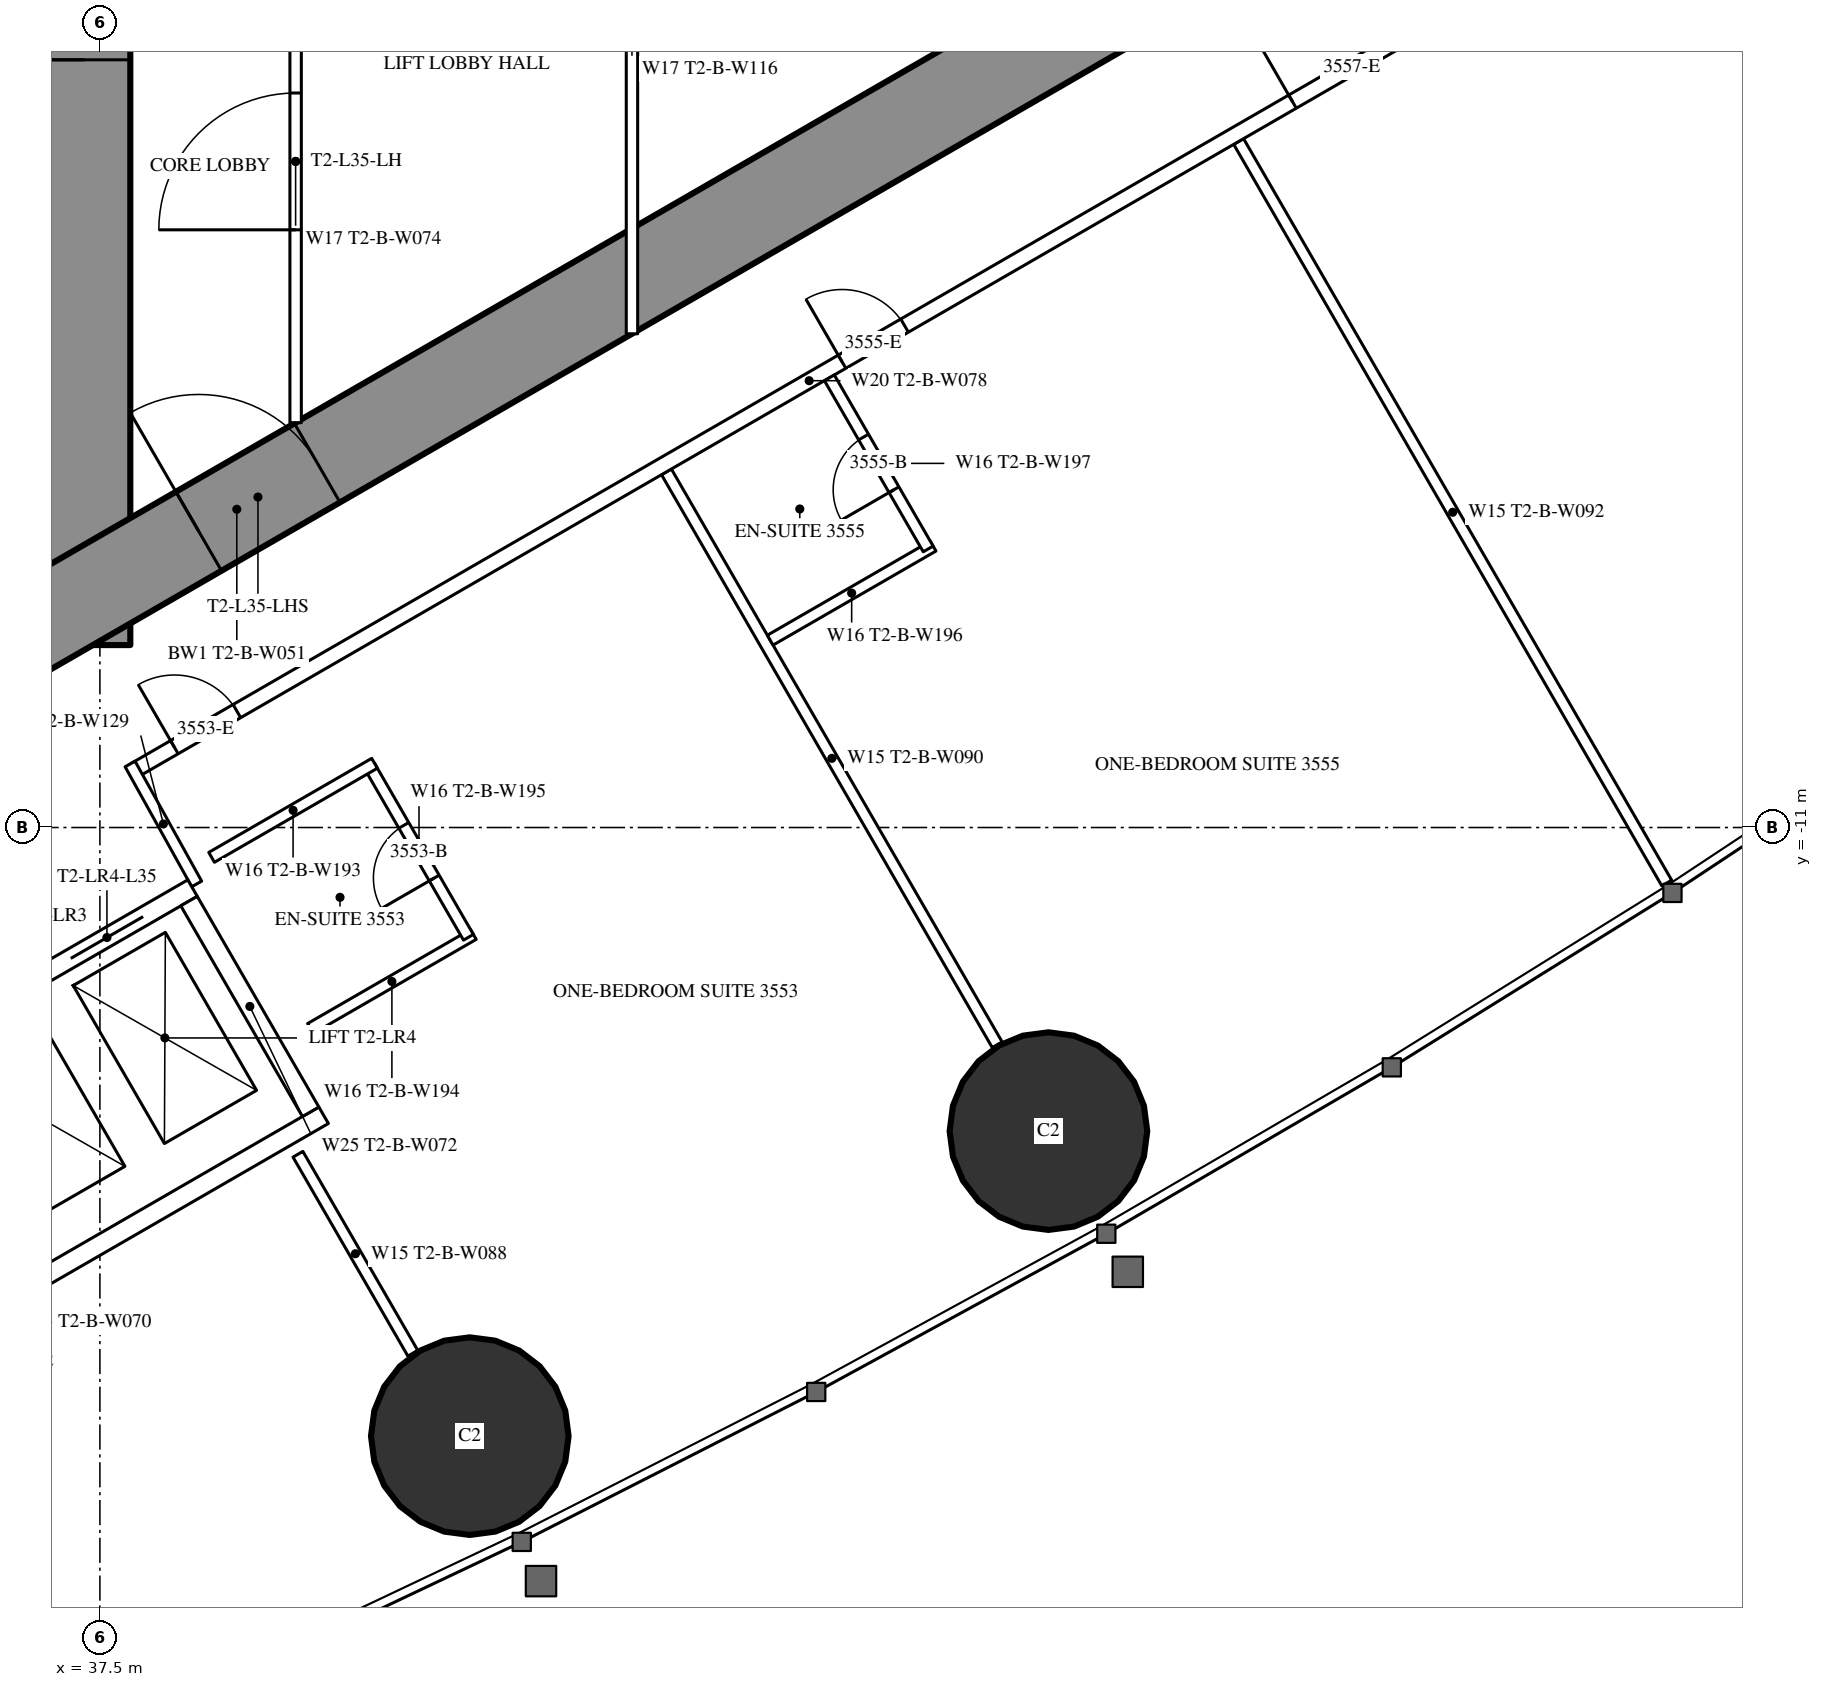
"""IFC4 building model, lengths in metres.
Left out: names, types, materials, properties, quantities, classifications, styles, units other than length and angle.
Written with IfcOpenShell. Run it as: python <this file> out.ifc"""

import sys

from ifc_helpers import new_model, si_unit, direction, frame, frame_2d, origin, origin_2d, place, context, subcontext, project, spatial, rectangle, hollow_circle, extrude, element, fill, save


model = new_model("IFC4")
c1 = context("Model", 3, precision=1e-05, world=origin(), true_north=direction((0.0, 1.0)))
c2 = subcontext(c1, "Body", "Model", "MODEL_VIEW")
j1 = project(units=[si_unit("LENGTHUNIT", "METRE"), si_unit("PLANEANGLEUNIT", "RADIAN")], contexts=[c1])
p1 = place(None, origin())
s1 = spatial("IfcSite", under=j1, at=p1, CompositionType="ELEMENT")
p2 = place(p1, origin())
s2 = spatial("IfcBuilding", under=s1, at=p2, CompositionType="ELEMENT")
p3 = place(p2, frame((0.0, 0.0, 132.6)))
s3 = spatial("IfcBuildingStorey", under=s2, at=p3, CompositionType="ELEMENT", Elevation=132.6)
for number, where, z_axis, x_axis in (
    (1, (42.366, -19.007, 0.0), (0.0, 0.0, 1.0), (1.0, 0.0, 0.0)),
    (2, (49.979, -14.994, 0.0), (0.0, 0.0, 1.0), (1.0, 0.0, 0.0)),
):
    element("IfcColumn", number, at=place(p3, frame(where, z_axis=z_axis, x_axis=x_axis)), inside=s3, PredefinedType="COLUMN", context=c2, shape_type="SweptSolid", body=[
        extrude(hollow_circle(Radius=1.3, WallThickness=0.1, at=origin_2d()), origin(), (0.0, 0.0, 1.0), 3.5),
    ])
p4 = place(p3, frame((37.3, -8.6, 0.0), z_axis=(0.0, 0.0, 1.0), x_axis=(0.0, 1.0, 0.0)))
e3 = element("IfcWall", 3, at=p4, inside=s3, PredefinedType="SHEAR", context=c2, shape_type="SweptSolid", body=[
    extrude(rectangle(XDim=17.2, YDim=1.2, at=frame_2d((8.6, 0.0))), origin(), (0.0, 0.0, 1.0), 3.5),
])
p5 = place(p4, frame((7.7, 0.0, 0.0)))
e4 = element("IfcOpeningElement", 4, at=p5, cuts=e3, PredefinedType="OPENING", context=c2, shape_type="SweptSolid", body=[
    extrude(rectangle(XDim=1.8, YDim=2.2, at=frame_2d((0.9, 1.1))), frame((0.0, 0.61, 0.0), z_axis=(0.0, -1.0, 0.0), x_axis=(1.0, 0.0, 0.0)), (0.0, 0.0, 1.0), 1.22),
])
p6 = place(p3, frame((27.2, -13.8, 0.0), z_axis=(0.0, 0.0, 1.0), x_axis=(0.866027159892, 0.499996958321, 0.0)))
e5 = element("IfcWall", 5, at=p6, inside=s3, PredefinedType="SHEAR", context=c2, shape_type="SweptSolid", body=[
    extrude(rectangle(XDim=27.947, YDim=1.2, at=frame_2d((13.973, 0.0))), origin(), (0.0, 0.0, 1.0), 3.5),
])
p7 = place(p6, frame((4.6, 0.0, 0.0)))
e6 = element("IfcOpeningElement", 6, at=p7, cuts=e5, PredefinedType="OPENING", context=c2, shape_type="SweptSolid", body=[
    extrude(rectangle(XDim=1.0, YDim=2.2, at=frame_2d((0.5, 1.1))), frame((0.0, 0.61, 0.0), z_axis=(0.0, -1.0, 0.0), x_axis=(1.0, 0.0, 0.0)), (0.0, 0.0, 1.0), 1.22),
])
p8 = place(p6, frame((13.395, 0.0, 0.0)))
e7 = element("IfcOpeningElement", 7, at=p8, cuts=e5, PredefinedType="OPENING", context=c2, shape_type="SweptSolid", body=[
    extrude(rectangle(XDim=1.8, YDim=2.2, at=frame_2d((0.9, 1.1))), frame((0.0, 0.61, 0.0), z_axis=(0.0, -1.0, 0.0), x_axis=(1.0, 0.0, 0.0)), (0.0, 0.0, 1.0), 1.22),
])
p9 = place(p3, frame((44.954, -6.321, 0.0), z_axis=(0.0, 0.0, 1.0), x_axis=(0.500018676722, -0.866014620505, 0.0)))
e8 = element("IfcWall", 8, at=p9, inside=s3, PredefinedType="PARTITIONING", context=c2, shape_type="SweptSolid", body=[
    extrude(rectangle(XDim=8.704, YDim=0.15, at=frame_2d((4.352, 0.0))), origin(), (0.0, 0.0, 1.0), 2.2),
])
p10 = place(p3, frame((52.481, -1.975, 0.0), z_axis=(0.0, 0.0, 1.0), x_axis=(0.500003867771, -0.866023170714, 0.0)))
e9 = element("IfcWall", 9, at=p10, inside=s3, PredefinedType="PARTITIONING", context=c2, shape_type="SweptSolid", body=[
    extrude(rectangle(XDim=11.265, YDim=0.15, at=frame_2d((5.632, 0.0))), origin(), (0.0, 0.0, 1.0), 3.25),
])
p11 = place(p3, frame((40.105, -15.299, 0.0), z_axis=(0.0, 0.0, 1.0), x_axis=(0.499978822259, -0.866037630414, 0.0)))
e10 = element("IfcWall", 10, at=p11, inside=s3, PredefinedType="PARTITIONING", context=c2, shape_type="SweptSolid", body=[
    extrude(rectangle(XDim=3.023, YDim=0.15, at=frame_2d((1.511, 0.0))), origin(), (0.0, 0.0, 1.0), 3.25),
])
p12 = place(p3, frame((37.96, -10.243, 0.0), z_axis=(0.0, 0.0, 1.0), x_axis=(0.866026429433, 0.499998223521, 0.0)))
e11 = element("IfcWall", 11, at=p12, inside=s3, PredefinedType="PARTITIONING", context=c2, shape_type="SweptSolid", body=[
    extrude(rectangle(XDim=20.487, YDim=0.2, at=frame_2d((10.243, 0.0))), origin(), (0.0, 0.0, 1.0), 3.25),
])
p13 = place(p12, frame((10.743, 0.0, 0.0)))
e12 = element("IfcOpeningElement", 12, at=p13, cuts=e11, PredefinedType="OPENING", context=c2, shape_type="SweptSolid", body=[
    extrude(rectangle(XDim=0.95, YDim=2.2, at=frame_2d((0.475, 1.1))), frame((0.0, 0.11, 0.0), z_axis=(0.0, -1.0, 0.0), x_axis=(1.0, 0.0, 0.0)), (0.0, 0.0, 1.0), 0.22),
])
p14 = place(p12, frame((17.586, 0.0, 0.0)))
e13 = element("IfcOpeningElement", 13, at=p14, cuts=e11, PredefinedType="OPENING", context=c2, shape_type="SweptSolid", body=[
    extrude(rectangle(XDim=1.8, YDim=2.2, at=frame_2d((0.9, 1.1))), frame((0.0, 0.11, 0.0), z_axis=(0.0, -1.0, 0.0), x_axis=(1.0, 0.0, 0.0)), (0.0, 0.0, 1.0), 0.22),
])
p15 = place(p12, frame((0.6, 0.0, 0.0)))
e14 = element("IfcOpeningElement", 14, at=p15, cuts=e11, PredefinedType="OPENING", context=c2, shape_type="SweptSolid", body=[
    extrude(rectangle(XDim=0.95, YDim=2.2, at=frame_2d((0.475, 1.1))), frame((0.0, 0.11, 0.0), z_axis=(0.0, -1.0, 0.0), x_axis=(1.0, 0.0, 0.0)), (0.0, 0.0, 1.0), 0.22),
])
p16 = place(p3, frame((38.773, -11.742, 0.0), z_axis=(0.0, 0.0, 1.0), x_axis=(-0.485528096672, 0.8742210632, 0.0)))
e15 = element("IfcWall", 15, at=p16, inside=s3, PredefinedType="PARTITIONING", context=c2, shape_type="SweptSolid", body=[
    extrude(rectangle(XDim=1.805, YDim=0.15, at=frame_2d((0.903, 0.0))), origin(), (0.0, 0.0, 1.0), 3.25),
])
p17 = place(p3, frame((46.319, -8.535, 0.0), z_axis=(0.0, 0.0, 1.0), x_axis=(0.866006523861, 0.500032699561, 0.0)))
e16 = element("IfcWall", 16, at=p17, inside=s3, PredefinedType="PARTITIONING", context=c2, shape_type="SweptSolid", body=[
    extrude(rectangle(XDim=2.475, YDim=0.15, at=frame_2d((1.237, 0.0))), origin(), (0.0, 0.0, 1.0), 3.25),
])
p18 = place(p3, frame((47.097, -5.084, 0.0), z_axis=(0.0, 0.0, 1.0), x_axis=(0.500006934395, -0.866021400173, 0.0)))
e17 = element("IfcWall", 17, at=p18, inside=s3, PredefinedType="PARTITIONING", context=c2, shape_type="SweptSolid", body=[
    extrude(rectangle(XDim=2.6, YDim=0.15, at=frame_2d((1.3, 0.0))), origin(), (0.0, 0.0, 1.0), 3.25),
])
p19 = place(p18, frame((0.9, 0.0, 0.0)))
e18 = element("IfcOpeningElement", 18, at=p19, cuts=e17, PredefinedType="OPENING", context=c2, shape_type="SweptSolid", body=[
    extrude(rectangle(XDim=0.8, YDim=2.2, at=frame_2d((0.4, 1.1))), frame((0.0, 0.085, 0.0), z_axis=(0.0, -1.0, 0.0), x_axis=(1.0, 0.0, 0.0)), (0.0, 0.0, 1.0), 0.17),
])
p20 = place(p3, frame((40.27, -13.644, 0.0), z_axis=(0.0, 0.0, 1.0), x_axis=(0.866031185235, 0.4999899861, 0.0)))
e19 = element("IfcWall", 19, at=p20, inside=s3, PredefinedType="PARTITIONING", context=c2, shape_type="SweptSolid", body=[
    extrude(rectangle(XDim=2.475, YDim=0.15, at=frame_2d((1.238, 0.0))), origin(), (0.0, 0.0, 1.0), 3.25),
])
p21 = place(p3, frame((41.048, -10.193, 0.0), z_axis=(0.0, 0.0, 1.0), x_axis=(0.500047596559, -0.865997922154, 0.0)))
e20 = element("IfcWall", 20, at=p21, inside=s3, PredefinedType="PARTITIONING", context=c2, shape_type="SweptSolid", body=[
    extrude(rectangle(XDim=2.6, YDim=0.15, at=frame_2d((1.3, 0.0))), origin(), (0.0, 0.0, 1.0), 3.25),
])
p22 = place(p21, frame((0.9, 0.0, 0.0)))
e21 = element("IfcOpeningElement", 21, at=p22, cuts=e20, PredefinedType="OPENING", context=c2, shape_type="SweptSolid", body=[
    extrude(rectangle(XDim=0.8, YDim=2.2, at=frame_2d((0.4, 1.1))), frame((0.0, 0.085, 0.0), z_axis=(0.0, -1.0, 0.0), x_axis=(1.0, 0.0, 0.0)), (0.0, 0.0, 1.0), 0.17),
])
p23 = place(p3, frame((38.97, -11.393, 0.0), z_axis=(0.0, 0.0, 1.0), x_axis=(0.866031185235, 0.4999899861, 0.0)))
e22 = element("IfcWall", 22, at=p23, inside=s3, PredefinedType="PARTITIONING", context=c2, shape_type="SweptSolid", body=[
    extrude(rectangle(XDim=2.475, YDim=0.15, at=frame_2d((1.238, 0.0))), origin(), (0.0, 0.0, 1.0), 3.25),
])
p24 = place(p3, frame((40.075, -5.674, 0.0), z_axis=(0.0, 0.0, 1.0), x_axis=(0.0, 1.0, 0.0)))
e23 = element("IfcWall", 23, at=p24, inside=s3, PredefinedType="PARTITIONING", context=c2, shape_type="SweptSolid", body=[
    extrude(rectangle(XDim=6.874, YDim=0.15, at=frame_2d((3.437, 0.0))), origin(), (0.0, 0.0, 1.0), 3.25),
])
p25 = place(p24, frame((2.537, 0.0, 0.0)))
e24 = element("IfcOpeningElement", 24, at=p25, cuts=e23, PredefinedType="OPENING", context=c2, shape_type="SweptSolid", body=[
    extrude(rectangle(XDim=1.8, YDim=2.2, at=frame_2d((0.9, 1.1))), frame((0.0, 0.085, 0.0), z_axis=(0.0, -1.0, 0.0), x_axis=(1.0, 0.0, 0.0)), (0.0, 0.0, 1.0), 0.17),
])
p26 = place(p3, frame((44.5, -4.505, 0.0), z_axis=(0.0, 0.0, 1.0), x_axis=(0.0, 1.0, 0.0)))
e25 = element("IfcWall", 25, at=p26, inside=s3, PredefinedType="PARTITIONING", context=c2, shape_type="SweptSolid", body=[
    extrude(rectangle(XDim=9.009, YDim=0.15, at=frame_2d((4.505, 0.0))), origin(), (0.0, 0.0, 1.0), 2.45),
])
p27 = place(p26, frame((4.005, 0.0, 0.0)))
e26 = element("IfcOpeningElement", 26, at=p27, cuts=e25, PredefinedType="OPENING", context=c2, shape_type="SweptSolid", body=[
    extrude(rectangle(XDim=1.0, YDim=2.2, at=frame_2d((0.5, 1.1))), frame((0.0, 0.085, 0.0), z_axis=(0.0, -1.0, 0.0), x_axis=(1.0, 0.0, 0.0)), (0.0, 0.0, 1.0), 0.17),
])
p28 = place(p3, frame((31.271, -16.097, 0.0), z_axis=(0.0, 0.0, 1.0), x_axis=(0.86604045752, 0.499973925258, 0.0)))
e27 = element("IfcWall", 27, at=p28, inside=s3, PredefinedType="PARTITIONING", context=c2, shape_type="SweptSolid", body=[
    extrude(rectangle(XDim=8.6, YDim=0.25, at=frame_2d((4.3, 0.0))), origin(), (0.0, 0.0, 1.0), 3.25),
])
p29 = place(p28, frame((0.75, 0.0, 0.0)))
e28 = element("IfcOpeningElement", 28, at=p29, cuts=e27, PredefinedType="OPENING", context=c2, shape_type="SweptSolid", body=[
    extrude(rectangle(XDim=1.1, YDim=2.2, at=frame_2d((0.55, 1.1))), frame((0.0, 0.135, 0.0), z_axis=(0.0, -1.0, 0.0), x_axis=(1.0, 0.0, 0.0)), (0.0, 0.0, 1.0), 0.27),
])
p30 = place(p28, frame((2.75, 0.0, 0.0)))
e29 = element("IfcOpeningElement", 29, at=p30, cuts=e27, PredefinedType="OPENING", context=c2, shape_type="SweptSolid", body=[
    extrude(rectangle(XDim=1.1, YDim=2.2, at=frame_2d((0.55, 1.1))), frame((0.0, 0.135, 0.0), z_axis=(0.0, -1.0, 0.0), x_axis=(1.0, 0.0, 0.0)), (0.0, 0.0, 1.0), 0.27),
])
p31 = place(p28, frame((4.75, 0.0, 0.0)))
e30 = element("IfcOpeningElement", 30, at=p31, cuts=e27, PredefinedType="OPENING", context=c2, shape_type="SweptSolid", body=[
    extrude(rectangle(XDim=1.1, YDim=2.2, at=frame_2d((0.55, 1.1))), frame((0.0, 0.135, 0.0), z_axis=(0.0, -1.0, 0.0), x_axis=(1.0, 0.0, 0.0)), (0.0, 0.0, 1.0), 0.27),
])
p32 = place(p28, frame((6.75, 0.0, 0.0)))
e31 = element("IfcOpeningElement", 31, at=p32, cuts=e27, PredefinedType="OPENING", context=c2, shape_type="SweptSolid", body=[
    extrude(rectangle(XDim=1.1, YDim=2.2, at=frame_2d((0.55, 1.1))), frame((0.0, 0.135, 0.0), z_axis=(0.0, -1.0, 0.0), x_axis=(1.0, 0.0, 0.0)), (0.0, 0.0, 1.0), 0.27),
])
p33 = place(p3, frame((32.996, -19.086, 0.0), z_axis=(0.0, 0.0, 1.0), x_axis=(0.866028165386, 0.499995216735, 0.0)))
e32 = element("IfcWall", 32, at=p33, inside=s3, PredefinedType="PARTITIONING", context=c2, shape_type="SweptSolid", body=[
    extrude(rectangle(XDim=8.6, YDim=0.25, at=frame_2d((4.3, 0.0))), origin(), (0.0, 0.0, 1.0), 3.25),
])
p34 = place(p3, frame((38.673, -11.968, 0.0), z_axis=(0.0, 0.0, 1.0), x_axis=(0.499929347863, -0.866066190972, 0.0)))
e33 = element("IfcWall", 33, at=p34, inside=s3, PredefinedType="PARTITIONING", context=c2, shape_type="SweptSolid", body=[
    extrude(rectangle(XDim=3.201, YDim=0.25, at=frame_2d((1.6, 0.0))), origin(), (0.0, 0.0, 1.0), 3.25),
])
p35 = place(p19, origin())
e34 = element("IfcDoor", 34, at=p35, inside=s3, OperationType="SINGLE_SWING_RIGHT", PredefinedType="DOOR", context=c2, shape_type="SweptSolid", body=[
    extrude(rectangle(XDim=0.8, YDim=2.2, at=frame_2d((0.4, 1.1))), frame((0.0, 0.025, 0.0), z_axis=(0.0, -1.0, 0.0), x_axis=(1.0, 0.0, 0.0)), (0.0, 0.0, 1.0), 0.05),
])
fill(e18, e34)
p36 = place(p13, origin())
e35 = element("IfcDoor", 35, at=p36, inside=s3, OperationType="SINGLE_SWING_LEFT", PredefinedType="DOOR", context=c2, shape_type="SweptSolid", body=[
    extrude(rectangle(XDim=0.95, YDim=2.2, at=frame_2d((0.475, 1.1))), frame((0.0, 0.025, 0.0), z_axis=(0.0, -1.0, 0.0), x_axis=(1.0, 0.0, 0.0)), (0.0, 0.0, 1.0), 0.05),
])
fill(e12, e35)
p37 = place(p14, origin())
e36 = element("IfcDoor", 36, at=p37, inside=s3, OperationType="DOUBLE_DOOR_SINGLE_SWING", PredefinedType="DOOR", context=c2, shape_type="SweptSolid", body=[
    extrude(rectangle(XDim=1.8, YDim=2.2, at=frame_2d((0.9, 1.1))), frame((0.0, 0.025, 0.0), z_axis=(0.0, -1.0, 0.0), x_axis=(1.0, 0.0, 0.0)), (0.0, 0.0, 1.0), 0.05),
])
fill(e13, e36)
p38 = place(p22, origin())
e37 = element("IfcDoor", 37, at=p38, inside=s3, OperationType="SINGLE_SWING_RIGHT", PredefinedType="DOOR", context=c2, shape_type="SweptSolid", body=[
    extrude(rectangle(XDim=0.8, YDim=2.2, at=frame_2d((0.4, 1.1))), frame((0.0, 0.025, 0.0), z_axis=(0.0, -1.0, 0.0), x_axis=(1.0, 0.0, 0.0)), (0.0, 0.0, 1.0), 0.05),
])
fill(e21, e37)
p39 = place(p15, origin())
e38 = element("IfcDoor", 38, at=p39, inside=s3, OperationType="SINGLE_SWING_LEFT", PredefinedType="DOOR", context=c2, shape_type="SweptSolid", body=[
    extrude(rectangle(XDim=0.95, YDim=2.2, at=frame_2d((0.475, 1.1))), frame((0.0, 0.025, 0.0), z_axis=(0.0, -1.0, 0.0), x_axis=(1.0, 0.0, 0.0)), (0.0, 0.0, 1.0), 0.05),
])
fill(e14, e38)
p40 = place(p25, origin())
e39 = element("IfcDoor", 39, at=p40, inside=s3, OperationType="DOUBLE_DOOR_SINGLE_SWING", PredefinedType="DOOR", context=c2, shape_type="SweptSolid", body=[
    extrude(rectangle(XDim=1.8, YDim=2.2, at=frame_2d((0.9, 1.1))), frame((0.0, 0.025, 0.0), z_axis=(0.0, -1.0, 0.0), x_axis=(1.0, 0.0, 0.0)), (0.0, 0.0, 1.0), 0.05),
])
fill(e24, e39)
p41 = place(p8, origin())
e40 = element("IfcDoor", 40, at=p41, inside=s3, OperationType="DOUBLE_DOOR_SINGLE_SWING", PredefinedType="DOOR", context=c2, shape_type="SweptSolid", body=[
    extrude(rectangle(XDim=1.8, YDim=2.2, at=frame_2d((0.9, 1.1))), frame((0.0, 0.025, 0.0), z_axis=(0.0, -1.0, 0.0), x_axis=(1.0, 0.0, 0.0)), (0.0, 0.0, 1.0), 0.05),
])
fill(e7, e40)
p42 = place(p5, origin())
e41 = element("IfcDoor", 41, at=p42, inside=s3, OperationType="DOUBLE_DOOR_SINGLE_SWING", PredefinedType="DOOR", context=c2, shape_type="SweptSolid", body=[
    extrude(rectangle(XDim=1.8, YDim=2.2, at=frame_2d((0.9, 1.1))), frame((0.0, 0.025, 0.0), z_axis=(0.0, -1.0, 0.0), x_axis=(1.0, 0.0, 0.0)), (0.0, 0.0, 1.0), 0.05),
])
fill(e4, e41)
p43 = place(p32, origin())
e42 = element("IfcDoor", 42, at=p43, inside=s3, OperationType="DOUBLE_DOOR_SLIDING", PredefinedType="USERDEFINED", context=c2, shape_type="SweptSolid", body=[
    extrude(rectangle(XDim=1.1, YDim=2.2, at=frame_2d((0.55, 1.1))), frame((0.0, 0.025, 0.0), z_axis=(0.0, -1.0, 0.0), x_axis=(1.0, 0.0, 0.0)), (0.0, 0.0, 1.0), 0.05),
])
fill(e31, e42)
save(model, sys.argv[1])
